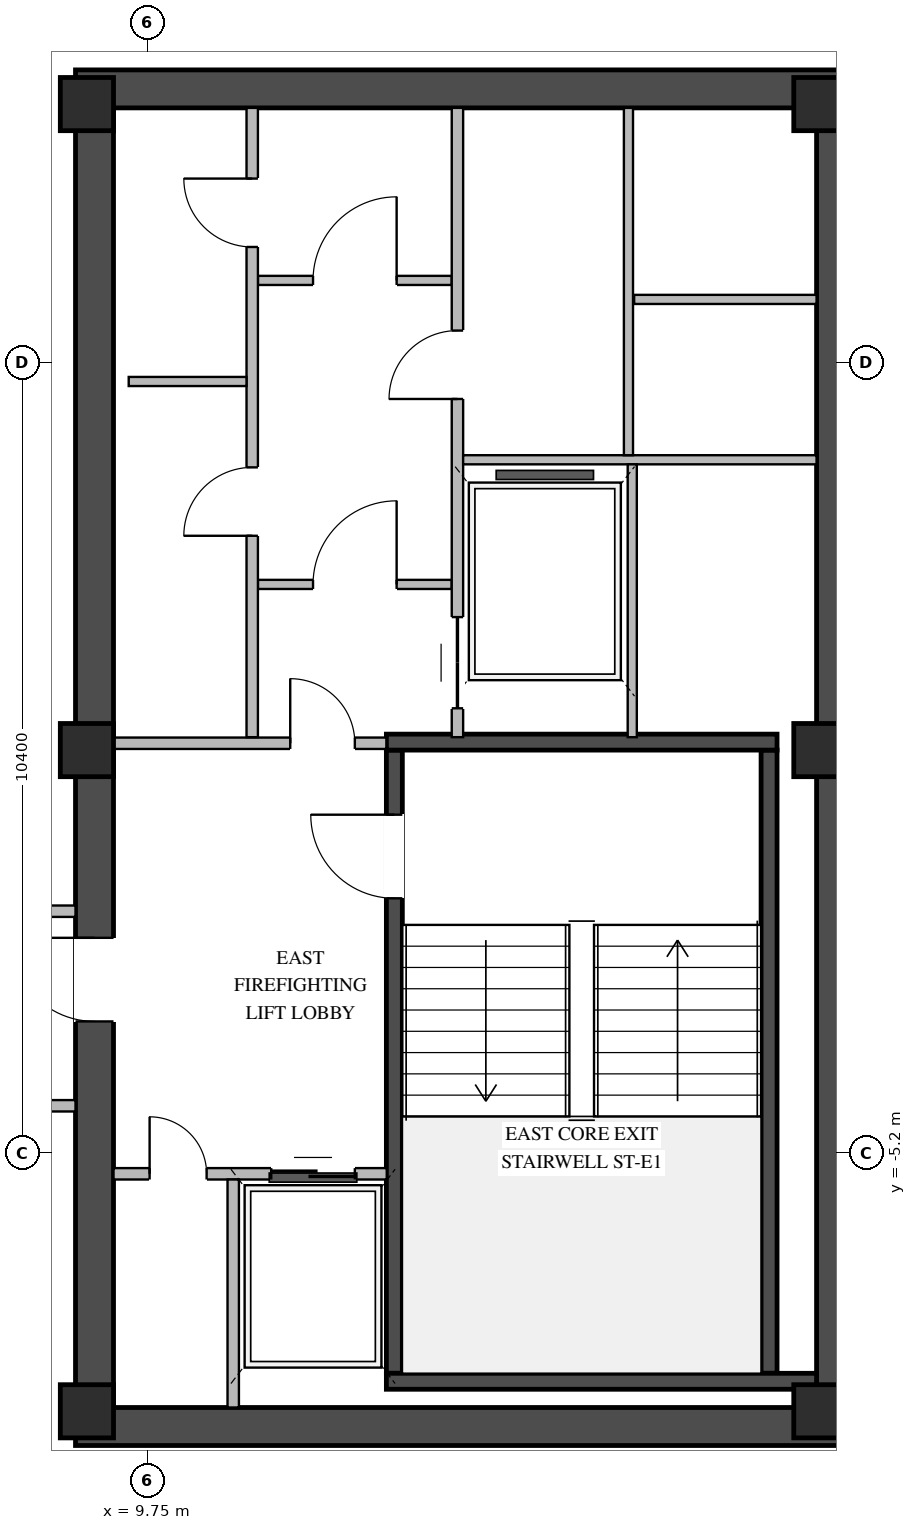
"""IFC4 building model, lengths in metres.
Left out: names, types, materials, properties, quantities, classifications, styles, units other than length and angle.
Written with IfcOpenShell. Run it as: python <this file> out.ifc"""

import sys

from ifc_helpers import new_model, si_unit, direction, frame, frame_2d, origin, origin_2d, place, context, subcontext, project, spatial, rectangle, extrude, element, fill, save


model = new_model("IFC4")
c1 = context("Model", 3, precision=1e-05, world=origin(), true_north=direction((0.0, 1.0)))
c2 = subcontext(c1, "Body", "Model", "MODEL_VIEW")
j1 = project(units=[si_unit("LENGTHUNIT", "METRE"), si_unit("PLANEANGLEUNIT", "RADIAN")], contexts=[c1])
p1 = place(None, origin())
s1 = spatial("IfcSite", under=j1, at=p1, CompositionType="ELEMENT")
p2 = place(p1, origin())
s2 = spatial("IfcBuilding", under=s1, at=p2, CompositionType="ELEMENT")
p3 = place(p2, frame((0.0, 0.0, 297.75)))
s3 = spatial("IfcBuildingStorey", under=s2, at=p3, CompositionType="ELEMENT", Elevation=297.75)
for number, where, z_axis, x_axis in (
    (1, (8.8, -8.8, 0.0), (0.0, 0.0, 1.0), (1.0, 0.0, 0.0)),
    (2, (8.8, 8.8, 0.0), (0.0, 0.0, 1.0), (1.0, 0.0, 0.0)),
):
    element("IfcWall", number, at=place(p3, frame(where, z_axis=z_axis, x_axis=x_axis)), inside=s3, PredefinedType="SHEAR", context=c2, shape_type="SweptSolid", body=[
        extrude(rectangle(XDim=10.25, YDim=0.5, at=frame_2d((5.125, 0.0))), origin(), (0.0, 0.0, 1.0), 3.35),
    ])
p4 = place(p3, frame((9.05, -8.55, 0.0), z_axis=(0.0, 0.0, 1.0), x_axis=(0.0, 1.0, 0.0)))
e3 = element("IfcWall", 3, at=p4, inside=s3, PredefinedType="SHEAR", context=c2, shape_type="SweptSolid", body=[
    extrude(rectangle(XDim=17.1, YDim=0.5, at=frame_2d((8.55, 0.0))), origin(), (0.0, 0.0, 1.0), 3.35),
])
p5 = place(p4, frame((5.08, 0.0, 0.0)))
e4 = element("IfcOpeningElement", 4, at=p5, cuts=e3, PredefinedType="OPENING", context=c2, shape_type="SweptSolid", body=[
    extrude(rectangle(XDim=1.1, YDim=2.08, at=frame_2d((0.55, 1.04))), frame((0.0, 0.26, 0.0), z_axis=(0.0, -1.0, 0.0), x_axis=(1.0, 0.0, 0.0)), (0.0, 0.0, 1.0), 0.52),
])
p6 = place(p3, frame((18.8, -8.55, 0.0), z_axis=(0.0, 0.0, 1.0), x_axis=(0.0, 1.0, 0.0)))
e5 = element("IfcWall", 5, at=p6, inside=s3, PredefinedType="SHEAR", context=c2, shape_type="SweptSolid", body=[
    extrude(rectangle(XDim=17.1, YDim=0.5, at=frame_2d((8.55, 0.0))), origin(), (0.0, 0.0, 1.0), 3.35),
])
p7 = place(p3, frame((12.995, -8.1, 0.0), z_axis=(0.0, 0.0, 1.0), x_axis=(0.0, 1.0, 0.0)))
e6 = element("IfcWall", 6, at=p7, inside=s3, PredefinedType="SHEAR", context=c2, shape_type="SweptSolid", body=[
    extrude(rectangle(XDim=8.2, YDim=0.21, at=frame_2d((4.1, 0.0))), origin(), (0.0, 0.0, 1.0), 3.35),
])
p8 = place(p7, frame((6.25, 0.0, 0.0)))
e7 = element("IfcOpeningElement", 7, at=p8, cuts=e6, PredefinedType="OPENING", context=c2, shape_type="SweptSolid", body=[
    extrude(rectangle(XDim=1.1, YDim=2.15, at=frame_2d((0.55, 1.075))), frame((0.0, 0.115, 0.0), z_axis=(0.0, -1.0, 0.0), x_axis=(1.0, 0.0, 0.0)), (0.0, 0.0, 1.0), 0.23),
])
p9 = place(p3, frame((17.925, -8.1, 0.0), z_axis=(0.0, 0.0, 1.0), x_axis=(0.0, 1.0, 0.0)))
e8 = element("IfcWall", 8, at=p9, inside=s3, PredefinedType="SHEAR", context=c2, shape_type="SweptSolid", body=[
    extrude(rectangle(XDim=8.2, YDim=0.21, at=frame_2d((4.1, 0.0))), origin(), (0.0, 0.0, 1.0), 3.35),
])
p10 = place(p3, frame((12.89, -8.205, 0.0), z_axis=(0.0, 0.0, 1.0), x_axis=(1.0, 0.0, 0.0)))
e9 = element("IfcWall", 9, at=p10, inside=s3, PredefinedType="SHEAR", context=c2, shape_type="SweptSolid", body=[
    extrude(rectangle(XDim=5.66, YDim=0.21, at=frame_2d((2.83, 0.0))), origin(), (0.0, 0.0, 1.0), 3.35),
])
p11 = place(p3, frame((18.03, 0.205, 0.0), z_axis=(0.0, 0.0, 1.0), x_axis=(-1.0, 0.0, 0.0)))
e10 = element("IfcWall", 10, at=p11, inside=s3, PredefinedType="SHEAR", context=c2, shape_type="SweptSolid", body=[
    extrude(rectangle(XDim=5.14, YDim=0.21, at=frame_2d((2.57, 0.0))), origin(), (0.0, 0.0, 1.0), 3.35),
])
for number, where, z_axis, x_axis in (
    (11, (8.95, -8.6, 0.0), (0.0, 0.0, 1.0), (1.0, 0.0, 0.0)),
    (12, (8.95, 0.1, 0.0), (0.0, 0.0, 1.0), (1.0, 0.0, 0.0)),
    (13, (8.95, 8.6, 0.0), (0.0, 0.0, 1.0), (1.0, 0.0, 0.0)),
    (14, (18.6, -8.6, 0.0), (0.0, 0.0, 1.0), (1.0, 0.0, 0.0)),
    (15, (18.6, 0.1, 0.0), (0.0, 0.0, 1.0), (1.0, 0.0, 0.0)),
    (16, (18.6, 8.6, 0.0), (0.0, 0.0, 1.0), (1.0, 0.0, 0.0)),
):
    element("IfcColumn", number, at=place(p3, frame(where, z_axis=z_axis, x_axis=x_axis)), inside=s3, PredefinedType="COLUMN", context=c2, shape_type="SweptSolid", body=[
        extrude(rectangle(XDim=0.7, YDim=0.7, at=origin_2d()), origin(), (0.0, 0.0, 1.0), 3.6),
    ])
p12 = place(p3, frame((9.3, -5.475, 0.0), z_axis=(0.0, 0.0, 1.0), x_axis=(1.0, 0.0, 0.0)))
e17 = element("IfcWall", 17, at=p12, inside=s3, PredefinedType="STANDARD", context=c2, shape_type="SweptSolid", body=[
    extrude(rectangle(XDim=3.595, YDim=0.15, at=frame_2d((1.797, 0.0))), origin(), (0.0, 0.0, 1.0), 3.33),
])
p13 = place(p12, frame((2.075, 0.0, 0.0)))
e18 = element("IfcOpeningElement", 18, at=p13, cuts=e17, PredefinedType="OPENING", context=c2, shape_type="SweptSolid", body=[
    extrude(rectangle(XDim=1.1, YDim=2.15, at=frame_2d((0.55, 1.075))), frame((0.0, 0.085, 0.0), z_axis=(0.0, -1.0, 0.0), x_axis=(1.0, 0.0, 0.0)), (0.0, 0.0, 1.0), 0.17),
])
p14 = place(p12, frame((0.475, 0.0, 0.0)))
e19 = element("IfcOpeningElement", 19, at=p14, cuts=e17, PredefinedType="OPENING", context=c2, shape_type="SweptSolid", body=[
    extrude(rectangle(XDim=0.75, YDim=2.05, at=frame_2d((0.375, 1.025))), frame((0.0, 0.085, 0.0), z_axis=(0.0, -1.0, 0.0), x_axis=(1.0, 0.0, 0.0)), (0.0, 0.0, 1.0), 0.17),
])
p15 = place(p3, frame((10.875, -8.55, 0.0), z_axis=(0.0, 0.0, 1.0), x_axis=(0.0, 1.0, 0.0)))
e20 = element("IfcWall", 20, at=p15, inside=s3, PredefinedType="STANDARD", context=c2, shape_type="SweptSolid", body=[
    extrude(rectangle(XDim=3.0, YDim=0.15, at=frame_2d((1.5, 0.0))), origin(), (0.0, 0.0, 1.0), 3.33),
])
p16 = place(p3, frame((9.3, 0.19, 0.0), z_axis=(0.0, 0.0, 1.0), x_axis=(1.0, 0.0, 0.0)))
e21 = element("IfcWall", 21, at=p16, inside=s3, PredefinedType="STANDARD", context=c2, shape_type="SweptSolid", body=[
    extrude(rectangle(XDim=3.59, YDim=0.15, at=frame_2d((1.795, 0.0))), origin(), (0.0, 0.0, 1.0), 2.825),
])
p17 = place(p16, frame((2.325, 0.0, 0.0)))
e22 = element("IfcOpeningElement", 22, at=p17, cuts=e21, PredefinedType="OPENING", context=c2, shape_type="SweptSolid", body=[
    extrude(rectangle(XDim=0.85, YDim=2.04, at=frame_2d((0.425, 1.02))), frame((0.0, 0.085, 0.0), z_axis=(0.0, -1.0, 0.0), x_axis=(1.0, 0.0, 0.0)), (0.0, 0.0, 1.0), 0.17),
])
p18 = place(p3, frame((11.2, 2.28, 0.0), z_axis=(0.0, 0.0, 1.0), x_axis=(1.0, 0.0, 0.0)))
e23 = element("IfcWall", 23, at=p18, inside=s3, PredefinedType="STANDARD", context=c2, shape_type="SweptSolid", body=[
    extrude(rectangle(XDim=2.55, YDim=0.12, at=frame_2d((1.275, 0.0))), origin(), (0.0, 0.0, 1.0), 3.33),
])
p19 = place(p18, frame((0.725, 0.0, 0.0)))
e24 = element("IfcOpeningElement", 24, at=p19, cuts=e23, PredefinedType="OPENING", context=c2, shape_type="SweptSolid", body=[
    extrude(rectangle(XDim=1.1, YDim=2.1, at=frame_2d((0.55, 1.05))), frame((0.0, 0.07, 0.0), z_axis=(0.0, -1.0, 0.0), x_axis=(1.0, 0.0, 0.0)), (0.0, 0.0, 1.0), 0.14),
])
p20 = place(p3, frame((11.2, 6.28, 0.0), z_axis=(0.0, 0.0, 1.0), x_axis=(1.0, 0.0, 0.0)))
e25 = element("IfcWall", 25, at=p20, inside=s3, PredefinedType="STANDARD", context=c2, shape_type="SweptSolid", body=[
    extrude(rectangle(XDim=2.55, YDim=0.12, at=frame_2d((1.275, 0.0))), origin(), (0.0, 0.0, 1.0), 3.33),
])
p21 = place(p20, frame((0.725, 0.0, 0.0)))
e26 = element("IfcOpeningElement", 26, at=p21, cuts=e25, PredefinedType="OPENING", context=c2, shape_type="SweptSolid", body=[
    extrude(rectangle(XDim=1.1, YDim=2.1, at=frame_2d((0.55, 1.05))), frame((0.0, 0.07, 0.0), z_axis=(0.0, -1.0, 0.0), x_axis=(1.0, 0.0, 0.0)), (0.0, 0.0, 1.0), 0.14),
])
p22 = place(p3, frame((11.125, 0.27, 0.0), z_axis=(0.0, 0.0, 1.0), x_axis=(0.0, 1.0, 0.0)))
e27 = element("IfcWall", 27, at=p22, inside=s3, PredefinedType="STANDARD", context=c2, shape_type="SweptSolid", body=[
    extrude(rectangle(XDim=8.28, YDim=0.15, at=frame_2d((4.14, 0.0))), origin(), (0.0, 0.0, 1.0), 3.33),
])
p23 = place(p22, frame((2.65, 0.0, 0.0)))
e28 = element("IfcOpeningElement", 28, at=p23, cuts=e27, PredefinedType="OPENING", context=c2, shape_type="SweptSolid", body=[
    extrude(rectangle(XDim=0.9, YDim=2.05, at=frame_2d((0.45, 1.025))), frame((0.0, 0.085, 0.0), z_axis=(0.0, -1.0, 0.0), x_axis=(1.0, 0.0, 0.0)), (0.0, 0.0, 1.0), 0.17),
])
p24 = place(p22, frame((6.45, 0.0, 0.0)))
e29 = element("IfcOpeningElement", 29, at=p24, cuts=e27, PredefinedType="OPENING", context=c2, shape_type="SweptSolid", body=[
    extrude(rectangle(XDim=0.9, YDim=2.05, at=frame_2d((0.45, 1.025))), frame((0.0, 0.085, 0.0), z_axis=(0.0, -1.0, 0.0), x_axis=(1.0, 0.0, 0.0)), (0.0, 0.0, 1.0), 0.17),
])
p25 = place(p3, frame((9.5, 4.95, 0.0), z_axis=(0.0, 0.0, 1.0), x_axis=(1.0, 0.0, 0.0)))
e30 = element("IfcWall", 30, at=p25, inside=s3, PredefinedType="STANDARD", context=c2, shape_type="SweptSolid", body=[
    extrude(rectangle(XDim=1.55, YDim=0.12, at=frame_2d((0.775, 0.0))), origin(), (0.0, 0.0, 1.0), 3.33),
])
p26 = place(p3, frame((13.825, 0.27, 0.0), z_axis=(0.0, 0.0, 1.0), x_axis=(0.0, 1.0, 0.0)))
e31 = element("IfcWall", 31, at=p26, inside=s3, PredefinedType="STANDARD", context=c2, shape_type="SweptSolid", body=[
    extrude(rectangle(XDim=8.28, YDim=0.15, at=frame_2d((4.14, 0.0))), origin(), (0.0, 0.0, 1.0), 3.33),
])
p27 = place(p26, frame((4.45, 0.0, 0.0)))
e32 = element("IfcOpeningElement", 32, at=p27, cuts=e31, PredefinedType="OPENING", context=c2, shape_type="SweptSolid", body=[
    extrude(rectangle(XDim=0.9, YDim=2.05, at=frame_2d((0.45, 1.025))), frame((0.0, 0.085, 0.0), z_axis=(0.0, -1.0, 0.0), x_axis=(1.0, 0.0, 0.0)), (0.0, 0.0, 1.0), 0.17),
])
p28 = place(p26, frame((0.38, 0.0, 0.0)))
e33 = element("IfcOpeningElement", 33, at=p28, cuts=e31, PredefinedType="OPENING", context=c2, shape_type="SweptSolid", body=[
    extrude(rectangle(XDim=1.2, YDim=2.1, at=frame_2d((0.6, 1.05))), frame((0.0, 0.085, 0.0), z_axis=(0.0, -1.0, 0.0), x_axis=(1.0, 0.0, 0.0)), (0.0, 0.0, 1.0), 0.17),
])
p29 = place(p3, frame((13.9, 3.92, 0.0), z_axis=(0.0, 0.0, 1.0), x_axis=(1.0, 0.0, 0.0)))
e34 = element("IfcWall", 34, at=p29, inside=s3, PredefinedType="STANDARD", context=c2, shape_type="SweptSolid", body=[
    extrude(rectangle(XDim=4.65, YDim=0.12, at=frame_2d((2.325, 0.0))), origin(), (0.0, 0.0, 1.0), 3.33),
])
p30 = place(p3, frame((16.15, 6.03, 0.0), z_axis=(0.0, 0.0, 1.0), x_axis=(1.0, 0.0, 0.0)))
e35 = element("IfcWall", 35, at=p30, inside=s3, PredefinedType="STANDARD", context=c2, shape_type="SweptSolid", body=[
    extrude(rectangle(XDim=2.4, YDim=0.12, at=frame_2d((1.2, 0.0))), origin(), (0.0, 0.0, 1.0), 3.33),
])
p31 = place(p3, frame((16.075, 3.98, 0.0), z_axis=(0.0, 0.0, 1.0), x_axis=(0.0, 1.0, 0.0)))
e36 = element("IfcWall", 36, at=p31, inside=s3, PredefinedType="STANDARD", context=c2, shape_type="SweptSolid", body=[
    extrude(rectangle(XDim=4.57, YDim=0.12, at=frame_2d((2.285, 0.0))), origin(), (0.0, 0.0, 1.0), 3.33),
])
p32 = place(p3, frame((16.125, 0.27, 0.0), z_axis=(0.0, 0.0, 1.0), x_axis=(0.0, 1.0, 0.0)))
e37 = element("IfcWall", 37, at=p32, inside=s3, PredefinedType="STANDARD", context=c2, shape_type="SweptSolid", body=[
    extrude(rectangle(XDim=3.59, YDim=0.12, at=frame_2d((1.795, 0.0))), origin(), (0.0, 0.0, 1.0), 3.33),
])
p33 = place(p3, frame((-8.8, -2.02, 0.0), z_axis=(0.0, 0.0, 1.0), x_axis=(1.0, 0.0, 0.0)))
e38 = element("IfcWall", 38, at=p33, inside=s3, PredefinedType="STANDARD", context=c2, shape_type="SweptSolid", body=[
    extrude(rectangle(XDim=17.6, YDim=0.15, at=frame_2d((8.8, 0.0))), origin(), (0.0, 0.0, 1.0), 3.33),
])
p34 = place(p33, frame((4.6, 0.0, 0.0)))
e39 = element("IfcOpeningElement", 39, at=p34, cuts=e38, PredefinedType="OPENING", context=c2, shape_type="SweptSolid", body=[
    extrude(rectangle(XDim=1.0, YDim=2.02, at=frame_2d((0.5, 1.01))), frame((0.0, 0.085, 0.0), z_axis=(0.0, -1.0, 0.0), x_axis=(1.0, 0.0, 0.0)), (0.0, 0.0, 1.0), 0.17),
])
p35 = place(p33, frame((13.4, 0.0, 0.0)))
e40 = element("IfcOpeningElement", 40, at=p35, cuts=e38, PredefinedType="OPENING", context=c2, shape_type="SweptSolid", body=[
    extrude(rectangle(XDim=1.0, YDim=2.02, at=frame_2d((0.5, 1.01))), frame((0.0, 0.085, 0.0), z_axis=(0.0, -1.0, 0.0), x_axis=(1.0, 0.0, 0.0)), (0.0, 0.0, 1.0), 0.17),
])
p36 = place(p3, frame((-8.8, -4.58, 0.0), z_axis=(0.0, 0.0, 1.0), x_axis=(1.0, 0.0, 0.0)))
e41 = element("IfcWall", 41, at=p36, inside=s3, PredefinedType="STANDARD", context=c2, shape_type="SweptSolid", body=[
    extrude(rectangle(XDim=17.6, YDim=0.15, at=frame_2d((8.8, 0.0))), origin(), (0.0, 0.0, 1.0), 3.33),
])
p37 = place(p36, frame((4.6, 0.0, 0.0)))
e42 = element("IfcOpeningElement", 42, at=p37, cuts=e41, PredefinedType="OPENING", context=c2, shape_type="SweptSolid", body=[
    extrude(rectangle(XDim=1.0, YDim=2.02, at=frame_2d((0.5, 1.01))), frame((0.0, 0.085, 0.0), z_axis=(0.0, -1.0, 0.0), x_axis=(1.0, 0.0, 0.0)), (0.0, 0.0, 1.0), 0.17),
])
p38 = place(p8, origin())
e43 = element("IfcDoor", 43, at=p38, inside=s3, OperationType="SINGLE_SWING_RIGHT", PredefinedType="DOOR", context=c2, shape_type="SweptSolid", body=[
    extrude(rectangle(XDim=1.1, YDim=2.15, at=frame_2d((0.55, 1.075))), frame((0.0, 0.025, 0.0), z_axis=(0.0, -1.0, 0.0), x_axis=(1.0, 0.0, 0.0)), (0.0, 0.0, 1.0), 0.05),
])
fill(e7, e43)
p39 = place(p13, origin())
e44 = element("IfcDoor", 44, at=p39, inside=s3, OperationType="DOUBLE_DOOR_SLIDING", PredefinedType="DOOR", context=c2, shape_type="SweptSolid", body=[
    extrude(rectangle(XDim=1.1, YDim=2.15, at=frame_2d((0.55, 1.075))), frame((0.0, 0.025, 0.0), z_axis=(0.0, -1.0, 0.0), x_axis=(1.0, 0.0, 0.0)), (0.0, 0.0, 1.0), 0.05),
])
fill(e18, e44)
p40 = place(p14, origin())
e45 = element("IfcDoor", 45, at=p40, inside=s3, OperationType="SINGLE_SWING_LEFT", PredefinedType="DOOR", context=c2, shape_type="SweptSolid", body=[
    extrude(rectangle(XDim=0.75, YDim=2.05, at=frame_2d((0.375, 1.025))), frame((0.0, 0.025, 0.0), z_axis=(0.0, -1.0, 0.0), x_axis=(1.0, 0.0, 0.0)), (0.0, 0.0, 1.0), 0.05),
])
fill(e19, e45)
p41 = place(p17, origin())
e46 = element("IfcDoor", 46, at=p41, inside=s3, OperationType="SINGLE_SWING_LEFT", PredefinedType="DOOR", context=c2, shape_type="SweptSolid", body=[
    extrude(rectangle(XDim=0.85, YDim=2.04, at=frame_2d((0.425, 1.02))), frame((0.0, 0.025, 0.0), z_axis=(0.0, -1.0, 0.0), x_axis=(1.0, 0.0, 0.0)), (0.0, 0.0, 1.0), 0.05),
])
fill(e22, e46)
p42 = place(p5, origin())
e47 = element("IfcDoor", 47, at=p42, inside=s3, OperationType="SINGLE_SWING_RIGHT", PredefinedType="DOOR", context=c2, shape_type="SweptSolid", body=[
    extrude(rectangle(XDim=1.1, YDim=2.08, at=frame_2d((0.55, 1.04))), frame((0.0, -0.155, 0.0), z_axis=(0.0, -1.0, 0.0), x_axis=(1.0, 0.0, 0.0)), (0.0, 0.0, 1.0), 0.05),
])
fill(e4, e47)
p43 = place(p19, origin())
e48 = element("IfcDoor", 48, at=p43, inside=s3, OperationType="SINGLE_SWING_RIGHT", PredefinedType="DOOR", context=c2, shape_type="SweptSolid", body=[
    extrude(rectangle(XDim=1.1, YDim=2.1, at=frame_2d((0.55, 1.05))), frame((0.0, 0.025, 0.0), z_axis=(0.0, -1.0, 0.0), x_axis=(1.0, 0.0, 0.0)), (0.0, 0.0, 1.0), 0.05),
])
fill(e24, e48)
p44 = place(p21, origin())
e49 = element("IfcDoor", 49, at=p44, inside=s3, OperationType="SINGLE_SWING_RIGHT", PredefinedType="DOOR", context=c2, shape_type="SweptSolid", body=[
    extrude(rectangle(XDim=1.1, YDim=2.1, at=frame_2d((0.55, 1.05))), frame((0.0, 0.025, 0.0), z_axis=(0.0, -1.0, 0.0), x_axis=(1.0, 0.0, 0.0)), (0.0, 0.0, 1.0), 0.05),
])
fill(e26, e49)
p45 = place(p23, origin())
e50 = element("IfcDoor", 50, at=p45, inside=s3, OperationType="SINGLE_SWING_LEFT", PredefinedType="DOOR", context=c2, shape_type="SweptSolid", body=[
    extrude(rectangle(XDim=0.9, YDim=2.05, at=frame_2d((0.45, 1.025))), frame((0.0, 0.025, 0.0), z_axis=(0.0, -1.0, 0.0), x_axis=(1.0, 0.0, 0.0)), (0.0, 0.0, 1.0), 0.05),
])
fill(e28, e50)
p46 = place(p24, origin())
e51 = element("IfcDoor", 51, at=p46, inside=s3, OperationType="SINGLE_SWING_RIGHT", PredefinedType="DOOR", context=c2, shape_type="SweptSolid", body=[
    extrude(rectangle(XDim=0.9, YDim=2.05, at=frame_2d((0.45, 1.025))), frame((0.0, 0.025, 0.0), z_axis=(0.0, -1.0, 0.0), x_axis=(1.0, 0.0, 0.0)), (0.0, 0.0, 1.0), 0.05),
])
fill(e29, e51)
p47 = place(p27, origin())
e52 = element("IfcDoor", 52, at=p47, inside=s3, OperationType="SINGLE_SWING_LEFT", PredefinedType="DOOR", context=c2, shape_type="SweptSolid", body=[
    extrude(rectangle(XDim=0.9, YDim=2.05, at=frame_2d((0.45, 1.025))), frame((0.0, 0.025, 0.0), z_axis=(0.0, -1.0, 0.0), x_axis=(1.0, 0.0, 0.0)), (0.0, 0.0, 1.0), 0.05),
])
fill(e32, e52)
p48 = place(p28, origin())
e53 = element("IfcDoor", 53, at=p48, inside=s3, OperationType="DOUBLE_DOOR_SLIDING", PredefinedType="DOOR", context=c2, shape_type="SweptSolid", body=[
    extrude(rectangle(XDim=1.2, YDim=2.1, at=frame_2d((0.6, 1.05))), frame((0.0, 0.025, 0.0), z_axis=(0.0, -1.0, 0.0), x_axis=(1.0, 0.0, 0.0)), (0.0, 0.0, 1.0), 0.05),
])
fill(e33, e53)
save(model, sys.argv[1])
